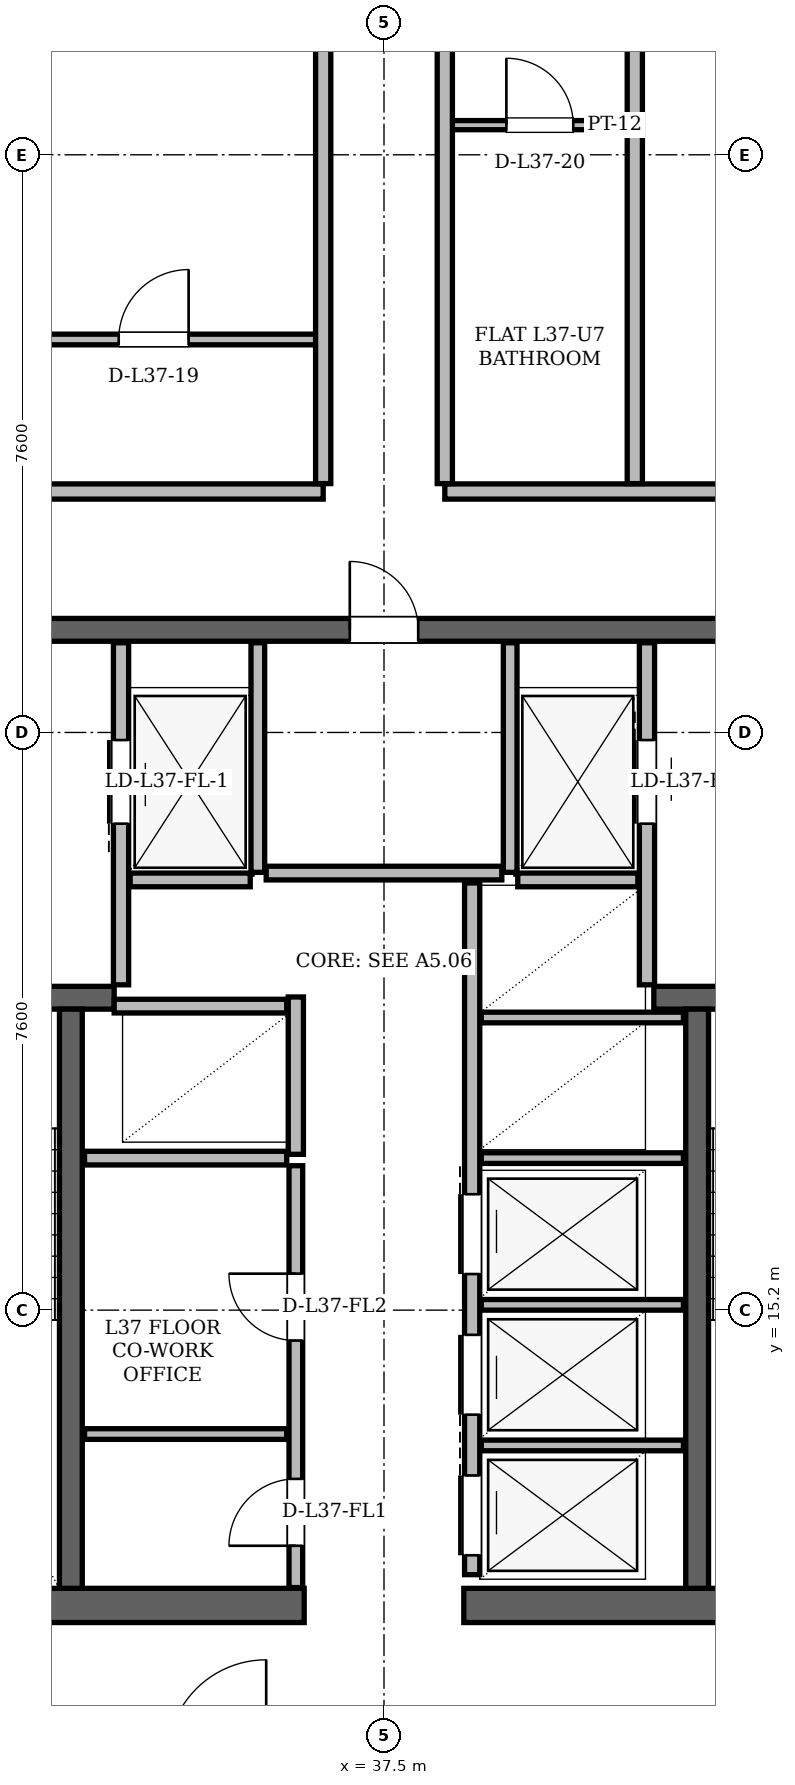
"""IFC4 building model, lengths in metres.
Left out: names, types, materials, properties, quantities, classifications, styles, units other than length and angle.
Written with IfcOpenShell. Run it as: python <this file> out.ifc"""

import sys

from ifc_helpers import new_model, si_unit, direction, frame, frame_2d, origin, place, context, subcontext, project, spatial, rectangle, extrude, element, fill, save


model = new_model("IFC4")
c1 = context("Model", 3, precision=1e-05, world=origin(), true_north=direction((0.0, 1.0)))
c2 = subcontext(c1, "Body", "Model", "MODEL_VIEW")
j1 = project(units=[si_unit("LENGTHUNIT", "METRE"), si_unit("PLANEANGLEUNIT", "RADIAN")], contexts=[c1])
p1 = place(None, origin())
s1 = spatial("IfcSite", under=j1, at=p1, CompositionType="ELEMENT")
p2 = place(p1, origin())
s2 = spatial("IfcBuilding", under=s1, at=p2, CompositionType="ELEMENT")
p3 = place(p2, frame((0.0, 0.0, 142.2)))
s3 = spatial("IfcBuildingStorey", under=s2, at=p3, CompositionType="ELEMENT", Elevation=142.2)
for number, where, z_axis, x_axis in (
    (1, (29.35, 11.315, 0.0), (0.0, 0.0, 1.0), (1.0, 0.0, 0.0)),
    (2, (38.55, 11.315, 0.0), (0.0, 0.0, 1.0), (1.0, 0.0, 0.0)),
):
    element("IfcWall", number, at=place(p3, frame(where, z_axis=z_axis, x_axis=x_axis)), inside=s3, PredefinedType="SHEAR", context=c2, shape_type="SweptSolid", body=[
        extrude(rectangle(XDim=7.1, YDim=0.45, at=frame_2d((3.55, 0.0))), origin(), (0.0, 0.0, 1.0), 3.36),
    ])
p4 = place(p3, frame((29.65, 24.15, 0.0), z_axis=(0.0, 0.0, 1.0), x_axis=(1.0, 0.0, 0.0)))
e3 = element("IfcWall", 3, at=p4, inside=s3, PredefinedType="SHEAR", context=c2, shape_type="SweptSolid", body=[
    extrude(rectangle(XDim=15.7, YDim=0.3, at=frame_2d((7.85, 0.0))), origin(), (0.0, 0.0, 1.0), 3.36),
])
p5 = place(p4, frame((1.7, 0.0, 0.0)))
e4 = element("IfcOpeningElement", 4, at=p5, cuts=e3, PredefinedType="OPENING", context=c2, shape_type="SweptSolid", body=[
    extrude(rectangle(XDim=1.2, YDim=2.2, at=frame_2d((0.6, 1.1))), frame((0.0, 0.15, 0.0), z_axis=(0.0, -1.0, 0.0), x_axis=(1.0, 0.0, 0.0)), (0.0, 0.0, 1.0), 0.3),
])
p6 = place(p4, frame((12.8, 0.0, 0.0)))
e5 = element("IfcOpeningElement", 5, at=p6, cuts=e3, PredefinedType="OPENING", context=c2, shape_type="SweptSolid", body=[
    extrude(rectangle(XDim=1.2, YDim=2.2, at=frame_2d((0.6, 1.1))), frame((0.0, 0.15, 0.0), z_axis=(0.0, -1.0, 0.0), x_axis=(1.0, 0.0, 0.0)), (0.0, 0.0, 1.0), 0.3),
])
p7 = place(p4, frame((7.4, 0.0, 0.0)))
e6 = element("IfcOpeningElement", 6, at=p7, cuts=e3, PredefinedType="OPENING", context=c2, shape_type="SweptSolid", body=[
    extrude(rectangle(XDim=0.9, YDim=2.05, at=frame_2d((0.45, 1.025))), frame((0.0, 0.15, 0.0), z_axis=(0.0, -1.0, 0.0), x_axis=(1.0, 0.0, 0.0)), (0.0, 0.0, 1.0), 0.3),
])
p8 = place(p3, frame((29.94, 19.31, 0.0), z_axis=(0.0, 0.0, 1.0), x_axis=(1.0, 0.0, 0.0)))
e7 = element("IfcWall", 7, at=p8, inside=s3, PredefinedType="SHEAR", context=c2, shape_type="SweptSolid", body=[
    extrude(rectangle(XDim=4.01, YDim=0.3, at=frame_2d((2.005, 0.0))), origin(), (0.0, 0.0, 1.0), 3.36),
])
p9 = place(p8, frame((1.01, 0.0, 0.0)))
e8 = element("IfcOpeningElement", 8, at=p9, cuts=e7, PredefinedType="OPENING", context=c2, shape_type="SweptSolid", body=[
    extrude(rectangle(XDim=1.4, YDim=2.2, at=frame_2d((0.7, 1.1))), frame((0.0, 0.15, 0.0), z_axis=(0.0, -1.0, 0.0), x_axis=(1.0, 0.0, 0.0)), (0.0, 0.0, 1.0), 0.3),
])
p10 = place(p3, frame((41.05, 19.31, 0.0), z_axis=(0.0, 0.0, 1.0), x_axis=(1.0, 0.0, 0.0)))
e9 = element("IfcWall", 9, at=p10, inside=s3, PredefinedType="SHEAR", context=c2, shape_type="SweptSolid", body=[
    extrude(rectangle(XDim=4.01, YDim=0.3, at=frame_2d((2.005, 0.0))), origin(), (0.0, 0.0, 1.0), 3.36),
])
p11 = place(p10, frame((1.6, 0.0, 0.0)))
e10 = element("IfcOpeningElement", 10, at=p11, cuts=e9, PredefinedType="OPENING", context=c2, shape_type="SweptSolid", body=[
    extrude(rectangle(XDim=1.4, YDim=2.2, at=frame_2d((0.7, 1.1))), frame((0.0, 0.15, 0.0), z_axis=(0.0, -1.0, 0.0), x_axis=(1.0, 0.0, 0.0)), (0.0, 0.0, 1.0), 0.3),
])
for number, where, z_axis, x_axis in (
    (11, (33.38, 11.54, 0.0), (0.0, 0.0, 1.0), (0.0, 1.0, 0.0)),
    (12, (41.62, 11.54, 0.0), (0.0, 0.0, 1.0), (0.0, 1.0, 0.0)),
):
    element("IfcWall", number, at=place(p3, frame(where, z_axis=z_axis, x_axis=x_axis)), inside=s3, PredefinedType="SHEAR", context=c2, shape_type="SweptSolid", body=[
        extrude(rectangle(XDim=7.62, YDim=0.3, at=frame_2d((3.81, 0.0))), origin(), (0.0, 0.0, 1.0), 3.36),
    ])
p12 = place(p3, frame((34.04, 19.48, 0.0), z_axis=(0.0, 0.0, 1.0), x_axis=(0.0, 1.0, 0.0)))
e13 = element("IfcWall", 13, at=p12, inside=s3, PredefinedType="PARTITIONING", context=c2, shape_type="SweptSolid", body=[
    extrude(rectangle(XDim=4.5, YDim=0.2, at=frame_2d((2.25, 0.0))), origin(), (0.0, 0.0, 1.0), 2.4),
])
p13 = place(p12, frame((2.12, 0.0, 0.0)))
e14 = element("IfcOpeningElement", 14, at=p13, cuts=e13, PredefinedType="OPENING", context=c2, shape_type="SweptSolid", body=[
    extrude(rectangle(XDim=1.1, YDim=2.2, at=frame_2d((0.55, 1.1))), frame((0.0, 0.1, 0.0), z_axis=(0.0, -1.0, 0.0), x_axis=(1.0, 0.0, 0.0)), (0.0, 0.0, 1.0), 0.2),
])
p14 = place(p3, frame((35.84, 20.96, 0.0), z_axis=(0.0, 0.0, 1.0), x_axis=(0.0, 1.0, 0.0)))
e15 = element("IfcWall", 15, at=p14, inside=s3, PredefinedType="PARTITIONING", context=c2, shape_type="SweptSolid", body=[
    extrude(rectangle(XDim=3.02, YDim=0.18, at=frame_2d((1.51, 0.0))), origin(), (0.0, 0.0, 1.0), 2.4),
])
p15 = place(p3, frame((34.16, 20.86, 0.0), z_axis=(0.0, 0.0, 1.0), x_axis=(1.0, 0.0, 0.0)))
e16 = element("IfcWall", 16, at=p15, inside=s3, PredefinedType="PARTITIONING", context=c2, shape_type="SweptSolid", body=[
    extrude(rectangle(XDim=1.58, YDim=0.18, at=frame_2d((0.79, 0.0))), origin(), (0.0, 0.0, 1.0), 3.36),
])
p16 = place(p3, frame((40.96, 19.48, 0.0), z_axis=(0.0, 0.0, 1.0), x_axis=(0.0, 1.0, 0.0)))
e17 = element("IfcWall", 17, at=p16, inside=s3, PredefinedType="PARTITIONING", context=c2, shape_type="SweptSolid", body=[
    extrude(rectangle(XDim=4.5, YDim=0.2, at=frame_2d((2.25, 0.0))), origin(), (0.0, 0.0, 1.0), 2.4),
])
p17 = place(p16, frame((2.12, 0.0, 0.0)))
e18 = element("IfcOpeningElement", 18, at=p17, cuts=e17, PredefinedType="OPENING", context=c2, shape_type="SweptSolid", body=[
    extrude(rectangle(XDim=1.1, YDim=2.2, at=frame_2d((0.55, 1.1))), frame((0.0, 0.1, 0.0), z_axis=(0.0, -1.0, 0.0), x_axis=(1.0, 0.0, 0.0)), (0.0, 0.0, 1.0), 0.2),
])
p18 = place(p3, frame((39.16, 20.96, 0.0), z_axis=(0.0, 0.0, 1.0), x_axis=(0.0, 1.0, 0.0)))
e19 = element("IfcWall", 19, at=p18, inside=s3, PredefinedType="PARTITIONING", context=c2, shape_type="SweptSolid", body=[
    extrude(rectangle(XDim=3.02, YDim=0.18, at=frame_2d((1.51, 0.0))), origin(), (0.0, 0.0, 1.0), 2.4),
])
p19 = place(p3, frame((39.26, 20.86, 0.0), z_axis=(0.0, 0.0, 1.0), x_axis=(1.0, 0.0, 0.0)))
e20 = element("IfcWall", 20, at=p19, inside=s3, PredefinedType="PARTITIONING", context=c2, shape_type="SweptSolid", body=[
    extrude(rectangle(XDim=1.58, YDim=0.18, at=frame_2d((0.79, 0.0))), origin(), (0.0, 0.0, 1.0), 3.36),
])
p20 = place(p3, frame((36.34, 17.25, 0.0), z_axis=(0.0, 0.0, 1.0), x_axis=(0.0, 1.0, 0.0)))
e21 = element("IfcWall", 21, at=p20, inside=s3, PredefinedType="PARTITIONING", context=c2, shape_type="SweptSolid", body=[
    extrude(rectangle(XDim=2.07, YDim=0.2, at=frame_2d((1.035, 0.0))), origin(), (0.0, 0.0, 1.0), 3.36),
])
p21 = place(p3, frame((33.95, 19.2, 0.0), z_axis=(0.0, 0.0, 1.0), x_axis=(1.0, 0.0, 0.0)))
e22 = element("IfcWall", 22, at=p21, inside=s3, PredefinedType="PARTITIONING", context=c2, shape_type="SweptSolid", body=[
    extrude(rectangle(XDim=2.27, YDim=0.18, at=frame_2d((1.135, 0.0))), origin(), (0.0, 0.0, 1.0), 3.36),
])
p22 = place(p3, frame((33.56, 17.2, 0.0), z_axis=(0.0, 0.0, 1.0), x_axis=(1.0, 0.0, 0.0)))
e23 = element("IfcWall", 23, at=p22, inside=s3, PredefinedType="PARTITIONING", context=c2, shape_type="SweptSolid", body=[
    extrude(rectangle(XDim=2.66, YDim=0.18, at=frame_2d((1.33, 0.0))), origin(), (0.0, 0.0, 1.0), 3.36),
])
p23 = place(p3, frame((36.34, 11.55, 0.0), z_axis=(0.0, 0.0, 1.0), x_axis=(0.0, 1.0, 0.0)))
e24 = element("IfcWall", 24, at=p23, inside=s3, PredefinedType="PARTITIONING", context=c2, shape_type="SweptSolid", body=[
    extrude(rectangle(XDim=5.55, YDim=0.18, at=frame_2d((2.775, 0.0))), origin(), (0.0, 0.0, 1.0), 3.36),
])
p24 = place(p23, frame((0.55, 0.0, 0.0)))
e25 = element("IfcOpeningElement", 25, at=p24, cuts=e24, PredefinedType="OPENING", context=c2, shape_type="SweptSolid", body=[
    extrude(rectangle(XDim=0.88, YDim=2.08, at=frame_2d((0.44, 1.04))), frame((0.0, 0.09, 0.0), z_axis=(0.0, -1.0, 0.0), x_axis=(1.0, 0.0, 0.0)), (0.0, 0.0, 1.0), 0.18),
])
p25 = place(p23, frame((3.25, 0.0, 0.0)))
e26 = element("IfcOpeningElement", 26, at=p25, cuts=e24, PredefinedType="OPENING", context=c2, shape_type="SweptSolid", body=[
    extrude(rectangle(XDim=0.88, YDim=2.08, at=frame_2d((0.44, 1.04))), frame((0.0, 0.09, 0.0), z_axis=(0.0, -1.0, 0.0), x_axis=(1.0, 0.0, 0.0)), (0.0, 0.0, 1.0), 0.18),
])
p26 = place(p3, frame((33.56, 13.57, 0.0), z_axis=(0.0, 0.0, 1.0), x_axis=(1.0, 0.0, 0.0)))
e27 = element("IfcWall", 27, at=p26, inside=s3, PredefinedType="PARTITIONING", context=c2, shape_type="SweptSolid", body=[
    extrude(rectangle(XDim=2.66, YDim=0.14, at=frame_2d((1.33, 0.0))), origin(), (0.0, 0.0, 1.0), 3.36),
])
p27 = place(p3, frame((38.66, 11.72, 0.0), z_axis=(0.0, 0.0, 1.0), x_axis=(0.0, 1.0, 0.0)))
e28 = element("IfcWall", 28, at=p27, inside=s3, PredefinedType="PARTITIONING", context=c2, shape_type="SweptSolid", body=[
    extrude(rectangle(XDim=9.1, YDim=0.2, at=frame_2d((4.55, 0.0))), origin(), (0.0, 0.0, 1.0), 3.36),
])
p28 = place(p27, frame((0.255, 0.0, 0.0)))
e29 = element("IfcOpeningElement", 29, at=p28, cuts=e28, PredefinedType="OPENING", context=c2, shape_type="SweptSolid", body=[
    extrude(rectangle(XDim=1.05, YDim=2.15, at=frame_2d((0.525, 1.075))), frame((0.0, 0.1, 0.0), z_axis=(0.0, -1.0, 0.0), x_axis=(1.0, 0.0, 0.0)), (0.0, 0.0, 1.0), 0.2),
])
p29 = place(p27, frame((2.105, 0.0, 0.0)))
e30 = element("IfcOpeningElement", 30, at=p29, cuts=e28, PredefinedType="OPENING", context=c2, shape_type="SweptSolid", body=[
    extrude(rectangle(XDim=1.05, YDim=2.15, at=frame_2d((0.525, 1.075))), frame((0.0, 0.1, 0.0), z_axis=(0.0, -1.0, 0.0), x_axis=(1.0, 0.0, 0.0)), (0.0, 0.0, 1.0), 0.2),
])
p30 = place(p27, frame((3.955, 0.0, 0.0)))
e31 = element("IfcOpeningElement", 31, at=p30, cuts=e28, PredefinedType="OPENING", context=c2, shape_type="SweptSolid", body=[
    extrude(rectangle(XDim=1.05, YDim=2.15, at=frame_2d((0.525, 1.075))), frame((0.0, 0.1, 0.0), z_axis=(0.0, -1.0, 0.0), x_axis=(1.0, 0.0, 0.0)), (0.0, 0.0, 1.0), 0.2),
])
for number, where, z_axis, x_axis in (
    (32, (38.78, 13.42, 0.0), (0.0, 0.0, 1.0), (1.0, 0.0, 0.0)),
    (33, (38.78, 15.27, 0.0), (0.0, 0.0, 1.0), (1.0, 0.0, 0.0)),
    (34, (38.78, 17.2, 0.0), (0.0, 0.0, 1.0), (1.0, 0.0, 0.0)),
    (35, (38.78, 19.05, 0.0), (0.0, 0.0, 1.0), (1.0, 0.0, 0.0)),
):
    element("IfcWall", number, at=place(p3, frame(where, z_axis=z_axis, x_axis=x_axis)), inside=s3, PredefinedType="PARTITIONING", context=c2, shape_type="SweptSolid", body=[
        extrude(rectangle(XDim=2.66, YDim=0.14, at=frame_2d((1.33, 0.0))), origin(), (0.0, 0.0, 1.0), 3.36),
    ])
p31 = place(p3, frame((35.95, 20.95, 0.0), z_axis=(0.0, 0.0, 1.0), x_axis=(1.0, 0.0, 0.0)))
e36 = element("IfcWall", 36, at=p31, inside=s3, PredefinedType="PARTITIONING", context=c2, shape_type="SweptSolid", body=[
    extrude(rectangle(XDim=3.1, YDim=0.18, at=frame_2d((1.55, 0.0))), origin(), (0.0, 0.0, 1.0), 3.36),
])
p32 = place(p3, frame((27.55, 25.97, 0.0), z_axis=(0.0, 0.0, 1.0), x_axis=(1.0, 0.0, 0.0)))
e37 = element("IfcWall", 37, at=p32, inside=s3, PredefinedType="PARTITIONING", context=c2, shape_type="SweptSolid", body=[
    extrude(rectangle(XDim=9.15, YDim=0.2, at=frame_2d((4.575, 0.0))), origin(), (0.0, 0.0, 1.0), 2.822),
])
p33 = place(p3, frame((38.3, 25.97, 0.0), z_axis=(0.0, 0.0, 1.0), x_axis=(1.0, 0.0, 0.0)))
e38 = element("IfcWall", 38, at=p33, inside=s3, PredefinedType="PARTITIONING", context=c2, shape_type="SweptSolid", body=[
    extrude(rectangle(XDim=11.7, YDim=0.2, at=frame_2d((5.85, 0.0))), origin(), (0.0, 0.0, 1.0), 2.822),
])
p34 = place(p33, frame((6.284, 0.0, 0.0)))
e39 = element("IfcOpeningElement", 39, at=p34, cuts=e38, PredefinedType="OPENING", context=c2, shape_type="SweptSolid", body=[
    extrude(rectangle(XDim=1.0, YDim=2.18, at=frame_2d((0.5, 1.09))), frame((0.0, 0.1, 0.0), z_axis=(0.0, -1.0, 0.0), x_axis=(1.0, 0.0, 0.0)), (0.0, 0.0, 1.0), 0.2),
])
p35 = place(p3, frame((23.885, 27.97, 0.0), z_axis=(0.0, 0.0, 1.0), x_axis=(1.0, 0.0, 0.0)))
e40 = element("IfcWall", 40, at=p35, inside=s3, PredefinedType="PARTITIONING", context=c2, shape_type="SweptSolid", body=[
    extrude(rectangle(XDim=12.865, YDim=0.14, at=frame_2d((6.433, 0.0))), origin(), (0.0, 0.0, 1.0), 2.822),
])
p36 = place(p35, frame((0.531, 0.0, 0.0)))
e41 = element("IfcOpeningElement", 41, at=p36, cuts=e40, PredefinedType="OPENING", context=c2, shape_type="SweptSolid", body=[
    extrude(rectangle(XDim=0.88, YDim=2.08, at=frame_2d((0.44, 1.04))), frame((0.0, 0.07, 0.0), z_axis=(0.0, -1.0, 0.0), x_axis=(1.0, 0.0, 0.0)), (0.0, 0.0, 1.0), 0.14),
])
p37 = place(p35, frame((3.05, 0.0, 0.0)))
e42 = element("IfcOpeningElement", 42, at=p37, cuts=e40, PredefinedType="OPENING", context=c2, shape_type="SweptSolid", body=[
    extrude(rectangle(XDim=0.95, YDim=2.1, at=frame_2d((0.475, 1.05))), frame((0.0, 0.07, 0.0), z_axis=(0.0, -1.0, 0.0), x_axis=(1.0, 0.0, 0.0)), (0.0, 0.0, 1.0), 0.14),
])
p38 = place(p35, frame((6.212, 0.0, 0.0)))
e43 = element("IfcOpeningElement", 43, at=p38, cuts=e40, PredefinedType="OPENING", context=c2, shape_type="SweptSolid", body=[
    extrude(rectangle(XDim=0.95, YDim=2.1, at=frame_2d((0.475, 1.05))), frame((0.0, 0.07, 0.0), z_axis=(0.0, -1.0, 0.0), x_axis=(1.0, 0.0, 0.0)), (0.0, 0.0, 1.0), 0.14),
])
p39 = place(p35, frame((10.124, 0.0, 0.0)))
e44 = element("IfcOpeningElement", 44, at=p39, cuts=e40, PredefinedType="OPENING", context=c2, shape_type="SweptSolid", body=[
    extrude(rectangle(XDim=0.92, YDim=2.12, at=frame_2d((0.46, 1.06))), frame((0.0, 0.07, 0.0), z_axis=(0.0, -1.0, 0.0), x_axis=(1.0, 0.0, 0.0)), (0.0, 0.0, 1.0), 0.14),
])
p40 = place(p3, frame((38.218, 30.79, 0.0), z_axis=(0.0, 0.0, 1.0), x_axis=(1.0, 0.0, 0.0)))
e45 = element("IfcWall", 45, at=p40, inside=s3, PredefinedType="PARTITIONING", context=c2, shape_type="SweptSolid", body=[
    extrude(rectangle(XDim=2.664, YDim=0.12, at=frame_2d((1.332, 0.0))), origin(), (0.0, 0.0, 1.0), 3.36),
])
p41 = place(p40, frame((0.892, 0.0, 0.0)))
e46 = element("IfcOpeningElement", 46, at=p41, cuts=e45, PredefinedType="OPENING", context=c2, shape_type="SweptSolid", body=[
    extrude(rectangle(XDim=0.88, YDim=2.08, at=frame_2d((0.44, 1.04))), frame((0.0, 0.06, 0.0), z_axis=(0.0, -1.0, 0.0), x_axis=(1.0, 0.0, 0.0)), (0.0, 0.0, 1.0), 0.12),
])
p42 = place(p3, frame((36.7, 26.074, 0.0), z_axis=(0.0, 0.0, 1.0), x_axis=(0.0, 1.0, 0.0)))
e47 = element("IfcWall", 47, at=p42, inside=s3, PredefinedType="PARTITIONING", context=c2, shape_type="SweptSolid", body=[
    extrude(rectangle(XDim=17.102, YDim=0.2, at=frame_2d((8.551, 0.0))), origin(), (0.0, 0.0, 1.0), 3.36),
])
p43 = place(p42, frame((7.042, 0.0, 0.0)))
e48 = element("IfcOpeningElement", 48, at=p43, cuts=e47, PredefinedType="OPENING", context=c2, shape_type="SweptSolid", body=[
    extrude(rectangle(XDim=1.0, YDim=2.18, at=frame_2d((0.5, 1.09))), frame((0.0, 0.1, 0.0), z_axis=(0.0, -1.0, 0.0), x_axis=(1.0, 0.0, 0.0)), (0.0, 0.0, 1.0), 0.2),
])
p44 = place(p3, frame((38.3, 26.074, 0.0), z_axis=(0.0, 0.0, 1.0), x_axis=(0.0, 1.0, 0.0)))
e49 = element("IfcWall", 49, at=p44, inside=s3, PredefinedType="PARTITIONING", context=c2, shape_type="SweptSolid", body=[
    extrude(rectangle(XDim=13.422, YDim=0.2, at=frame_2d((6.711, 0.0))), origin(), (0.0, 0.0, 1.0), 3.36),
])
p45 = place(p44, frame((8.528, 0.0, 0.0)))
e50 = element("IfcOpeningElement", 50, at=p45, cuts=e49, PredefinedType="OPENING", context=c2, shape_type="SweptSolid", body=[
    extrude(rectangle(XDim=1.0, YDim=2.18, at=frame_2d((0.5, 1.09))), frame((0.0, 0.1, 0.0), z_axis=(0.0, -1.0, 0.0), x_axis=(1.0, 0.0, 0.0)), (0.0, 0.0, 1.0), 0.2),
])
p46 = place(p3, frame((40.8, 26.074, 0.0), z_axis=(0.0, 0.0, 1.0), x_axis=(0.0, 1.0, 0.0)))
e51 = element("IfcWall", 51, at=p46, inside=s3, PredefinedType="PARTITIONING", context=c2, shape_type="SweptSolid", body=[
    extrude(rectangle(XDim=17.102, YDim=0.2, at=frame_2d((8.551, 0.0))), origin(), (0.0, 0.0, 1.0), 3.36),
])
p47 = place(p24, origin())
e52 = element("IfcDoor", 52, at=p47, inside=s3, OperationType="SINGLE_SWING_LEFT", PredefinedType="DOOR", context=c2, shape_type="SweptSolid", body=[
    extrude(rectangle(XDim=0.88, YDim=2.08, at=frame_2d((0.44, 1.04))), frame((0.0, 0.025, 0.0), z_axis=(0.0, -1.0, 0.0), x_axis=(1.0, 0.0, 0.0)), (0.0, 0.0, 1.0), 0.05),
])
fill(e25, e52)
p48 = place(p25, origin())
e53 = element("IfcDoor", 53, at=p48, inside=s3, OperationType="SINGLE_SWING_RIGHT", PredefinedType="DOOR", context=c2, shape_type="SweptSolid", body=[
    extrude(rectangle(XDim=0.88, YDim=2.08, at=frame_2d((0.44, 1.04))), frame((0.0, 0.025, 0.0), z_axis=(0.0, -1.0, 0.0), x_axis=(1.0, 0.0, 0.0)), (0.0, 0.0, 1.0), 0.05),
])
fill(e26, e53)
p49 = place(p13, origin())
e54 = element("IfcDoor", 54, at=p49, inside=s3, OperationType="SLIDING_TO_LEFT", PredefinedType="DOOR", context=c2, shape_type="SweptSolid", body=[
    extrude(rectangle(XDim=1.1, YDim=2.2, at=frame_2d((0.55, 1.1))), frame((0.0, 0.025, 0.0), z_axis=(0.0, -1.0, 0.0), x_axis=(1.0, 0.0, 0.0)), (0.0, 0.0, 1.0), 0.05),
])
fill(e14, e54)
p50 = place(p17, origin())
e55 = element("IfcDoor", 55, at=p50, inside=s3, OperationType="SLIDING_TO_RIGHT", PredefinedType="DOOR", context=c2, shape_type="SweptSolid", body=[
    extrude(rectangle(XDim=1.1, YDim=2.2, at=frame_2d((0.55, 1.1))), frame((0.0, 0.025, 0.0), z_axis=(0.0, -1.0, 0.0), x_axis=(1.0, 0.0, 0.0)), (0.0, 0.0, 1.0), 0.05),
])
fill(e18, e55)
p51 = place(p28, origin())
e56 = element("IfcDoor", 56, at=p51, inside=s3, OperationType="SLIDING_TO_RIGHT", PredefinedType="DOOR", context=c2, shape_type="SweptSolid", body=[
    extrude(rectangle(XDim=1.05, YDim=2.15, at=frame_2d((0.525, 1.075))), frame((0.0, 0.025, 0.0), z_axis=(0.0, -1.0, 0.0), x_axis=(1.0, 0.0, 0.0)), (0.0, 0.0, 1.0), 0.05),
])
fill(e29, e56)
p52 = place(p29, origin())
e57 = element("IfcDoor", 57, at=p52, inside=s3, OperationType="SLIDING_TO_LEFT", PredefinedType="DOOR", context=c2, shape_type="SweptSolid", body=[
    extrude(rectangle(XDim=1.05, YDim=2.15, at=frame_2d((0.525, 1.075))), frame((0.0, 0.025, 0.0), z_axis=(0.0, -1.0, 0.0), x_axis=(1.0, 0.0, 0.0)), (0.0, 0.0, 1.0), 0.05),
])
fill(e30, e57)
p53 = place(p30, origin())
e58 = element("IfcDoor", 58, at=p53, inside=s3, OperationType="SLIDING_TO_RIGHT", PredefinedType="DOOR", context=c2, shape_type="SweptSolid", body=[
    extrude(rectangle(XDim=1.05, YDim=2.15, at=frame_2d((0.525, 1.075))), frame((0.0, 0.025, 0.0), z_axis=(0.0, -1.0, 0.0), x_axis=(1.0, 0.0, 0.0)), (0.0, 0.0, 1.0), 0.05),
])
fill(e31, e58)
p54 = place(p7, origin())
e59 = element("IfcDoor", 59, at=p54, inside=s3, OperationType="SINGLE_SWING_LEFT", PredefinedType="DOOR", context=c2, shape_type="SweptSolid", body=[
    extrude(rectangle(XDim=0.9, YDim=2.05, at=frame_2d((0.45, 1.025))), frame((0.0, 0.025, 0.0), z_axis=(0.0, -1.0, 0.0), x_axis=(1.0, 0.0, 0.0)), (0.0, 0.0, 1.0), 0.05),
])
fill(e6, e59)
p55 = place(p39, origin())
e60 = element("IfcDoor", 60, at=p55, inside=s3, OperationType="SINGLE_SWING_RIGHT", PredefinedType="DOOR", context=c2, shape_type="SweptSolid", body=[
    extrude(rectangle(XDim=0.92, YDim=2.12, at=frame_2d((0.46, 1.06))), frame((0.0, 0.025, 0.0), z_axis=(0.0, -1.0, 0.0), x_axis=(1.0, 0.0, 0.0)), (0.0, 0.0, 1.0), 0.05),
])
fill(e44, e60)
p56 = place(p41, origin())
e61 = element("IfcDoor", 61, at=p56, inside=s3, OperationType="SINGLE_SWING_LEFT", PredefinedType="DOOR", context=c2, shape_type="SweptSolid", body=[
    extrude(rectangle(XDim=0.88, YDim=2.08, at=frame_2d((0.44, 1.04))), frame((0.0, 0.025, 0.0), z_axis=(0.0, -1.0, 0.0), x_axis=(1.0, 0.0, 0.0)), (0.0, 0.0, 1.0), 0.05),
])
fill(e46, e61)
save(model, sys.argv[1])
